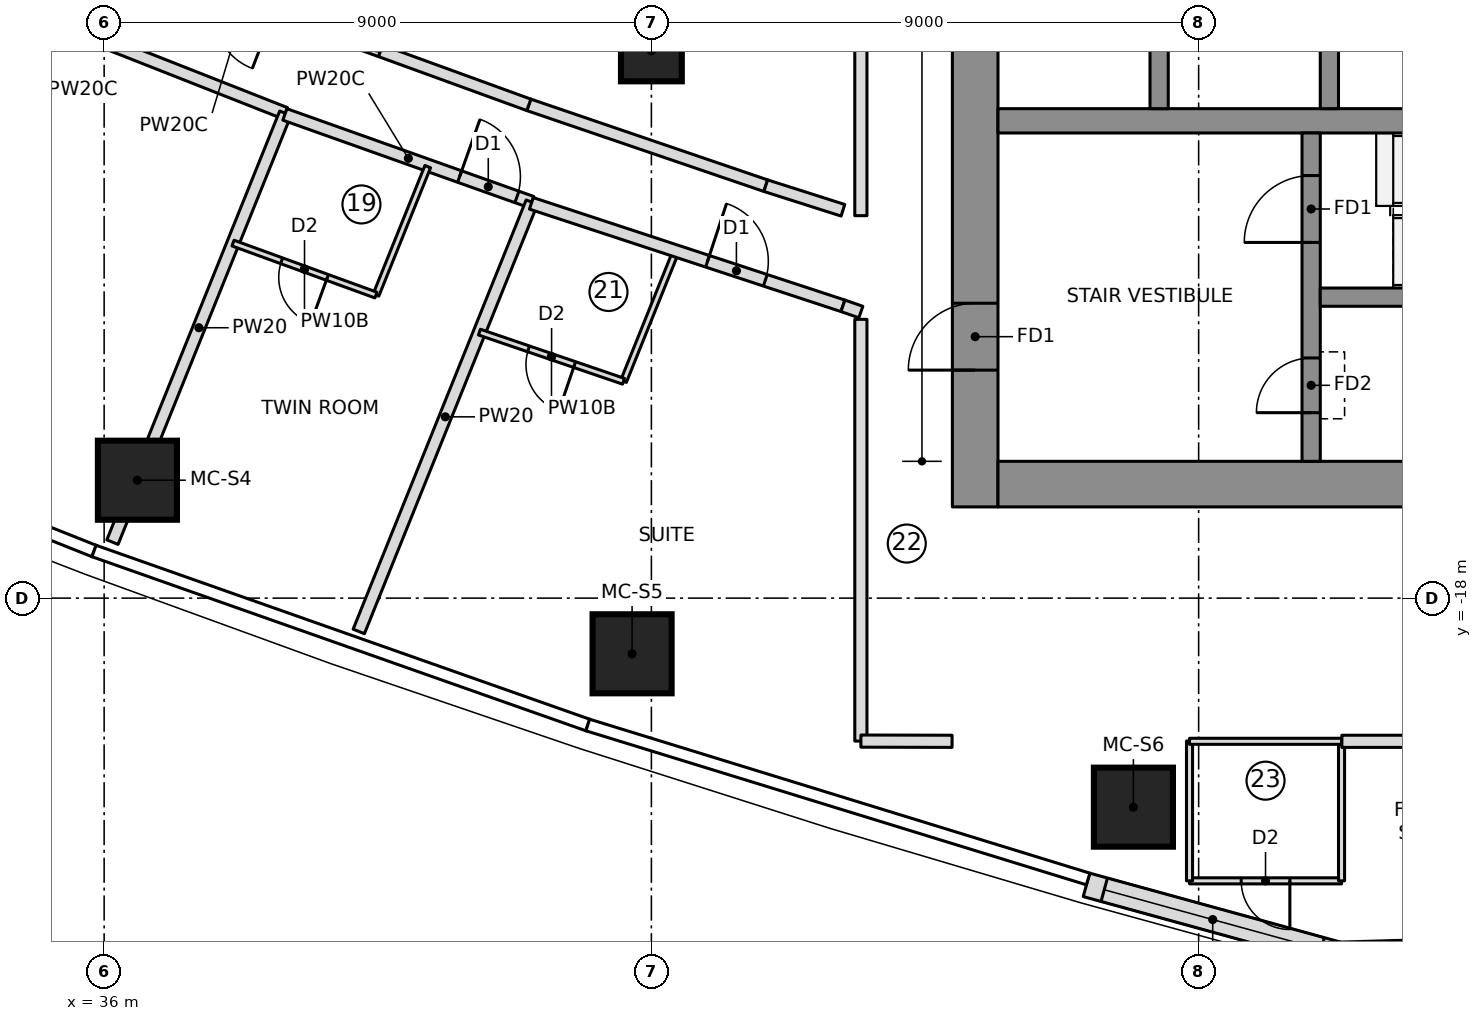
"""IFC4 building model, lengths in metres.
Left out: names, types, materials, properties, quantities, classifications, styles, units other than length and angle.
Written with IfcOpenShell. Run it as: python <this file> out.ifc"""

import sys

from ifc_helpers import new_model, si_unit, direction, frame, frame_2d, origin, origin_2d, place, context, subcontext, project, spatial, polyline, rectangle, outline, extrude, element, fill, save


model = new_model("IFC4")
c1 = context("Model", 3, precision=1e-05, world=origin(), true_north=direction((0.0, 1.0)))
c2 = subcontext(c1, "Body", "Model", "MODEL_VIEW")
j1 = project(units=[si_unit("LENGTHUNIT", "METRE"), si_unit("PLANEANGLEUNIT", "RADIAN")], contexts=[c1])
p1 = place(None, origin())
s1 = spatial("IfcSite", under=j1, at=p1, CompositionType="ELEMENT")
p2 = place(p1, origin())
s2 = spatial("IfcBuilding", under=s1, at=p2, CompositionType="ELEMENT")
p3 = place(p2, frame((0.0, 0.0, 179.05)))
s3 = spatial("IfcBuildingStorey", under=s2, at=p3, CompositionType="ELEMENT", Elevation=179.05)
p4 = place(p3, frame((50.325, -16.5, 0.0), z_axis=(0.0, 0.0, 1.0), x_axis=(0.0, 1.0, 0.0)))
e1 = element("IfcWall", 1, at=p4, inside=s3, PredefinedType="SHEAR", context=c2, shape_type="SweptSolid", body=[
    extrude(rectangle(XDim=9.85, YDim=0.75, at=frame_2d((4.925, 0.0))), origin(), (0.0, 0.0, 1.0), 3.55),
])
p5 = place(p4, frame((2.25, 0.0, 0.0)))
e2 = element("IfcOpeningElement", 2, at=p5, cuts=e1, PredefinedType="OPENING", context=c2, shape_type="SweptSolid", body=[
    extrude(rectangle(XDim=1.1, YDim=2.1, at=frame_2d((0.55, 1.05))), frame((0.0, 0.385, 0.0), z_axis=(0.0, -1.0, 0.0), x_axis=(1.0, 0.0, 0.0)), (0.0, 0.0, 1.0), 0.77),
])
p6 = place(p3, frame((50.7, -16.125, 0.0), z_axis=(0.0, 0.0, 1.0), x_axis=(1.0, 0.0, 0.0)))
e3 = element("IfcWall", 3, at=p6, inside=s3, PredefinedType="SHEAR", context=c2, shape_type="SweptSolid", body=[
    extrude(rectangle(XDim=13.77, YDim=0.75, at=frame_2d((6.885, 0.0))), origin(), (0.0, 0.0, 1.0), 3.55),
])
p7 = place(p3, frame((50.7, -10.15, 0.0), z_axis=(0.0, 0.0, 1.0), x_axis=(1.0, 0.0, 0.0)))
e4 = element("IfcWall", 4, at=p7, inside=s3, PredefinedType="SHEAR", context=c2, shape_type="SweptSolid", body=[
    extrude(rectangle(XDim=13.02, YDim=0.4, at=frame_2d((6.51, 0.0))), origin(), (0.0, 0.0, 1.0), 3.55),
])
for number, where, z_axis, x_axis in (
    (5, (53.35, -9.95, 0.0), (0.0, 0.0, 1.0), (0.0, 1.0, 0.0)),
    (6, (56.15, -9.95, 0.0), (0.0, 0.0, 1.0), (0.0, 1.0, 0.0)),
):
    element("IfcWall", number, at=place(p3, frame(where, z_axis=z_axis, x_axis=x_axis)), inside=s3, PredefinedType="SHEAR", context=c2, shape_type="SweptSolid", body=[
        extrude(rectangle(XDim=3.0, YDim=0.3, at=frame_2d((1.5, 0.0))), origin(), (0.0, 0.0, 1.0), 3.55),
    ])
p8 = place(p3, frame((55.85, -15.75, 0.0), z_axis=(0.0, 0.0, 1.0), x_axis=(0.0, 1.0, 0.0)))
e7 = element("IfcWall", 7, at=p8, inside=s3, PredefinedType="SHEAR", context=c2, shape_type="SweptSolid", body=[
    extrude(rectangle(XDim=5.4, YDim=0.3, at=frame_2d((2.7, 0.0))), origin(), (0.0, 0.0, 1.0), 3.55),
])
p9 = place(p8, frame((3.6, 0.0, 0.0)))
e8 = element("IfcOpeningElement", 8, at=p9, cuts=e7, PredefinedType="OPENING", context=c2, shape_type="SweptSolid", body=[
    extrude(rectangle(XDim=1.1, YDim=2.1, at=frame_2d((0.55, 1.05))), frame((0.0, 0.16, 0.0), z_axis=(0.0, -1.0, 0.0), x_axis=(1.0, 0.0, 0.0)), (0.0, 0.0, 1.0), 0.32),
])
p10 = place(p8, frame((0.8, 0.0, 0.0)))
e9 = element("IfcOpeningElement", 9, at=p10, cuts=e7, PredefinedType="OPENING", context=c2, shape_type="SweptSolid", body=[
    extrude(rectangle(XDim=0.9, YDim=2.1, at=frame_2d((0.45, 1.05))), frame((0.0, 0.16, 0.0), z_axis=(0.0, -1.0, 0.0), x_axis=(1.0, 0.0, 0.0)), (0.0, 0.0, 1.0), 0.32),
])
p11 = place(p3, frame((56.0, -13.05, 0.0), z_axis=(0.0, 0.0, 1.0), x_axis=(1.0, 0.0, 0.0)))
e10 = element("IfcWall", 10, at=p11, inside=s3, PredefinedType="SHEAR", context=c2, shape_type="SweptSolid", body=[
    extrude(rectangle(XDim=7.72, YDim=0.3, at=frame_2d((3.86, 0.0))), origin(), (0.0, 0.0, 1.0), 3.55),
])
for number, where, z_axis, x_axis in (
    (11, (36.547, -16.061, 0.0), (0.0, 0.0, 1.0), (1.0, 0.0, 0.0)),
    (12, (44.683, -18.916, 0.0), (0.0, 0.0, 1.0), (1.0, 0.0, 0.0)),
    (13, (52.927, -21.438, 0.0), (0.0, 0.0, 1.0), (1.0, 0.0, 0.0)),
):
    element("IfcColumn", number, at=place(p3, frame(where, z_axis=z_axis, x_axis=x_axis)), inside=s3, PredefinedType="COLUMN", context=c2, shape_type="SweptSolid", body=[
        extrude(rectangle(XDim=1.3, YDim=1.3, at=origin_2d()), origin(), (0.0, 0.0, 1.0), 3.55),
    ])
p12 = place(p3, frame((45.0, -9.0, 0.0), z_axis=(0.0, 0.0, 1.0), x_axis=(1.0, 0.0, 0.0)))
e14 = element("IfcColumn", 14, at=p12, inside=s3, PredefinedType="COLUMN", context=c2, shape_type="SweptSolid", body=[
    extrude(rectangle(XDim=1.0, YDim=1.0, at=origin_2d()), origin(), (0.0, 0.0, 1.0), 3.55),
])
p13 = place(p3, frame((52.155, -22.716, 0.0), z_axis=(0.0, 0.0, 1.0), x_axis=(0.964205755089, -0.265155165617, 0.0)))
e15 = element("IfcWall", 15, at=p13, inside=s3, PredefinedType="NOTDEFINED", context=c2, shape_type="SweptSolid", body=[
    extrude(outline(polyline([(0.0, -0.2), (4.337, -0.2), (4.277, 0.2), (0.0, 0.2), (0.0, -0.2)])), origin(), (0.0, 0.0, 1.0), 3.25),
])
p14 = place(p13, frame((0.303, 0.0, 0.9)))
e16 = element("IfcOpeningElement", 16, at=p14, cuts=e15, PredefinedType="OPENING", context=c2, shape_type="SweptSolid", body=[
    extrude(rectangle(XDim=3.7, YDim=1.8, at=frame_2d((1.85, 0.9))), frame((0.0, 0.21, 0.0), z_axis=(0.0, -1.0, 0.0), x_axis=(1.0, 0.0, 0.0)), (0.0, 0.0, 1.0), 0.42),
])
p15 = place(p3, frame((56.308, -23.858, 0.0), z_axis=(0.0, 0.0, 1.0), x_axis=(0.999587920197, 0.028705222472, 0.0)))
e17 = element("IfcWall", 17, at=p15, inside=s3, PredefinedType="NOTDEFINED", context=c2, shape_type="SweptSolid", body=[
    extrude(outline(polyline([(-0.03, -0.2), (3.989, -0.2), (3.87, 0.2), (0.03, 0.2), (-0.03, -0.2)])), origin(), (0.0, 0.0, 1.0), 3.25),
])
p16 = place(p15, frame((0.865, 0.0, 0.6)))
e18 = element("IfcOpeningElement", 18, at=p16, cuts=e17, PredefinedType="OPENING", context=c2, shape_type="SweptSolid", body=[
    extrude(outline(polyline([(0.0, 1.35), (0.084, 1.771), (0.322, 2.128), (0.679, 2.366), (1.1, 2.45), (1.521, 2.366), (1.878, 2.128), (2.116, 1.771), (2.2, 1.35), (2.2, 1.1), (2.116, 0.679), (1.878, 0.322), (1.521, 0.084), (1.1, 0.0), (0.679, 0.084), (0.322, 0.322), (0.084, 0.679), (0.0, 1.1), (0.0, 1.35)])), frame((0.0, 0.21, 0.0), z_axis=(0.0, -1.0, 0.0), x_axis=(1.0, 0.0, 0.0)), (0.0, 0.0, 1.0), 0.42),
])
p17 = place(p3, frame((56.35, -22.65, 0.0), z_axis=(0.0, 0.0, 1.0), x_axis=(-1.0, 0.0, 0.0)))
e19 = element("IfcWall", 19, at=p17, inside=s3, PredefinedType="PARTITIONING", context=c2, shape_type="SweptSolid", body=[
    extrude(rectangle(XDim=2.5, YDim=0.1, at=frame_2d((1.25, 0.0))), origin(), (0.0, 0.0, 1.0), 3.25),
])
p18 = place(p17, frame((0.85, 0.0, 0.0)))
e20 = element("IfcOpeningElement", 20, at=p18, cuts=e19, PredefinedType="OPENING", context=c2, shape_type="SweptSolid", body=[
    extrude(rectangle(XDim=0.8, YDim=2.1, at=frame_2d((0.4, 1.05))), frame((0.0, 0.06, 0.0), z_axis=(0.0, -1.0, 0.0), x_axis=(1.0, 0.0, 0.0)), (0.0, 0.0, 1.0), 0.12),
])
for number, where, z_axis, x_axis in (
    (21, (53.85, -22.65, 0.0), (0.0, 0.0, 1.0), (0.0, 1.0, 0.0)),
    (22, (56.35, -20.35, 0.0), (0.0, 0.0, 1.0), (0.0, -1.0, 0.0)),
):
    element("IfcWall", number, at=place(p3, frame(where, z_axis=z_axis, x_axis=x_axis)), inside=s3, PredefinedType="PARTITIONING", context=c2, shape_type="SweptSolid", body=[
        extrude(rectangle(XDim=2.3, YDim=0.1, at=frame_2d((1.15, 0.0))), origin(), (0.0, 0.0, 1.0), 3.25),
    ])
p19 = place(p3, frame((30.958, -6.866, 0.0), z_axis=(0.0, 0.0, 1.0), x_axis=(0.93040517394, -0.366532689274, 0.0)))
e23 = element("IfcWall", 23, at=p19, inside=s3, PredefinedType="PARTITIONING", context=c2, shape_type="SweptSolid", body=[
    extrude(rectangle(XDim=8.622, YDim=0.2, at=frame_2d((4.311, 0.0))), origin(), (0.0, 0.0, 1.0), 3.25),
])
p20 = place(p19, frame((4.25, 0.0, 0.0)))
e24 = element("IfcOpeningElement", 24, at=p20, cuts=e23, PredefinedType="OPENING", context=c2, shape_type="SweptSolid", body=[
    extrude(rectangle(XDim=1.0, YDim=2.1, at=frame_2d((0.5, 1.05))), frame((0.0, 0.11, 0.0), z_axis=(0.0, -1.0, 0.0), x_axis=(1.0, 0.0, 0.0)), (0.0, 0.0, 1.0), 0.22),
])
p21 = place(p3, frame((36.137, -17.079, 0.0), z_axis=(0.0, 0.0, 1.0), x_axis=(0.373863662938, 0.927483671843, 0.0)))
e25 = element("IfcWall", 25, at=p21, inside=s3, PredefinedType="PARTITIONING", context=c2, shape_type="SweptSolid", body=[
    extrude(rectangle(XDim=7.604, YDim=0.2, at=frame_2d((3.802, 0.0))), origin(), (0.0, 0.0, 1.0), 3.25),
])
p22 = place(p3, frame((38.972, -10.045, 0.0), z_axis=(0.0, 0.0, 1.0), x_axis=(0.942220252757, -0.334994022773, 0.0)))
e26 = element("IfcWall", 26, at=p22, inside=s3, PredefinedType="PARTITIONING", context=c2, shape_type="SweptSolid", body=[
    extrude(rectangle(XDim=4.31, YDim=0.2, at=frame_2d((2.155, 0.0))), origin(), (0.0, 0.0, 1.0), 3.25),
])
p23 = place(p22, frame((3.05, 0.0, 0.0)))
e27 = element("IfcOpeningElement", 27, at=p23, cuts=e26, PredefinedType="OPENING", context=c2, shape_type="SweptSolid", body=[
    extrude(rectangle(XDim=1.0, YDim=2.1, at=frame_2d((0.5, 1.05))), frame((0.0, 0.11, 0.0), z_axis=(0.0, -1.0, 0.0), x_axis=(1.0, 0.0, 0.0)), (0.0, 0.0, 1.0), 0.22),
])
p24 = place(p3, frame((41.322, -10.903, 0.0), z_axis=(0.0, 0.0, 1.0), x_axis=(-0.373846436826, -0.927490615409, 0.0)))
e28 = element("IfcWall", 28, at=p24, inside=s3, PredefinedType="PARTITIONING", context=c2, shape_type="SweptSolid", body=[
    extrude(rectangle(XDim=2.279, YDim=0.1, at=frame_2d((1.139, 0.0))), origin(), (0.0, 0.0, 1.0), 3.25),
])
p25 = place(p3, frame((40.47, -13.016, 0.0), z_axis=(0.0, 0.0, 1.0), x_axis=(-0.939744972593, 0.341876273652, 0.0)))
e29 = element("IfcWall", 29, at=p25, inside=s3, PredefinedType="PARTITIONING", context=c2, shape_type="SweptSolid", body=[
    extrude(rectangle(XDim=2.501, YDim=0.1, at=frame_2d((1.251, 0.0))), origin(), (0.0, 0.0, 1.0), 3.25),
])
p26 = place(p25, frame((0.85, 0.0, 0.0)))
e30 = element("IfcOpeningElement", 30, at=p26, cuts=e29, PredefinedType="OPENING", context=c2, shape_type="SweptSolid", body=[
    extrude(rectangle(XDim=0.8, YDim=2.1, at=frame_2d((0.4, 1.05))), frame((0.0, 0.06, 0.0), z_axis=(0.0, -1.0, 0.0), x_axis=(1.0, 0.0, 0.0)), (0.0, 0.0, 1.0), 0.12),
])
p27 = place(p3, frame((40.188, -18.548, 0.0), z_axis=(0.0, 0.0, 1.0), x_axis=(0.373877998371, 0.927477893178, 0.0)))
e31 = element("IfcWall", 31, at=p27, inside=s3, PredefinedType="PARTITIONING", context=c2, shape_type="SweptSolid", body=[
    extrude(rectangle(XDim=7.611, YDim=0.2, at=frame_2d((3.806, 0.0))), origin(), (0.0, 0.0, 1.0), 3.25),
])
p28 = place(p3, frame((45.395, -12.318, 0.0), z_axis=(0.0, 0.0, 1.0), x_axis=(-0.373917841166, -0.927461831052, 0.0)))
e32 = element("IfcWall", 32, at=p28, inside=s3, PredefinedType="PARTITIONING", context=c2, shape_type="SweptSolid", body=[
    extrude(rectangle(XDim=2.281, YDim=0.1, at=frame_2d((1.14, 0.0))), origin(), (0.0, 0.0, 1.0), 3.25),
])
p29 = place(p3, frame((44.542, -14.434, 0.0), z_axis=(0.0, 0.0, 1.0), x_axis=(-0.946406575113, 0.322977699822, 0.0)))
e33 = element("IfcWall", 33, at=p29, inside=s3, PredefinedType="PARTITIONING", context=c2, shape_type="SweptSolid", body=[
    extrude(rectangle(XDim=2.504, YDim=0.1, at=frame_2d((1.252, 0.0))), origin(), (0.0, 0.0, 1.0), 3.25),
])
p30 = place(p29, frame((0.85, 0.0, 0.0)))
e34 = element("IfcOpeningElement", 34, at=p30, cuts=e33, PredefinedType="OPENING", context=c2, shape_type="SweptSolid", body=[
    extrude(rectangle(XDim=0.8, YDim=2.1, at=frame_2d((0.4, 1.05))), frame((0.0, 0.06, 0.0), z_axis=(0.0, -1.0, 0.0), x_axis=(1.0, 0.0, 0.0)), (0.0, 0.0, 1.0), 0.12),
])
p31 = place(p3, frame((40.547, -9.0, 0.0), z_axis=(0.0, 0.0, 1.0), x_axis=(-0.939741934926, 0.341884623435, 0.0)))
e35 = element("IfcWall", 35, at=p31, inside=s3, PredefinedType="PARTITIONING", context=c2, shape_type="SweptSolid", body=[
    extrude(rectangle(XDim=1.523, YDim=0.2, at=frame_2d((0.762, 0.0))), origin(), (0.0, 0.0, 1.0), 3.25),
])
p32 = place(p3, frame((46.881, -11.217, 0.0), z_axis=(0.0, 0.0, 1.0), x_axis=(-0.946436071896, 0.322891253852, 0.0)))
e36 = element("IfcWall", 36, at=p32, inside=s3, PredefinedType="PARTITIONING", context=c2, shape_type="SweptSolid", body=[
    extrude(rectangle(XDim=4.117, YDim=0.2, at=frame_2d((2.059, 0.0))), origin(), (0.0, 0.0, 1.0), 3.25),
])
p33 = place(p3, frame((42.984, -9.887, 0.0), z_axis=(0.0, 0.0, 1.0), x_axis=(-0.939719202565, 0.341947101655, 0.0)))
e37 = element("IfcWall", 37, at=p33, inside=s3, PredefinedType="PARTITIONING", context=c2, shape_type="SweptSolid", body=[
    extrude(rectangle(XDim=2.594, YDim=0.2, at=frame_2d((1.297, 0.0))), origin(), (0.0, 0.0, 1.0), 3.25),
])
p34 = place(p3, frame((56.355, -20.355, 0.0), z_axis=(0.0, 0.0, 1.0), x_axis=(1.0, 0.0, 0.0)))
e38 = element("IfcWall", 38, at=p34, inside=s3, PredefinedType="PARTITIONING", context=c2, shape_type="SweptSolid", body=[
    extrude(rectangle(XDim=7.354, YDim=0.2, at=frame_2d((3.677, 0.0))), origin(), (0.0, 0.0, 1.0), 3.25),
])
p35 = place(p34, frame((2.624, 0.0, 0.0)))
e39 = element("IfcOpeningElement", 39, at=p35, cuts=e38, PredefinedType="OPENING", context=c2, shape_type="SweptSolid", body=[
    extrude(rectangle(XDim=1.5, YDim=2.1, at=frame_2d((0.75, 1.05))), frame((0.0, 0.11, 0.0), z_axis=(0.0, -1.0, 0.0), x_axis=(1.0, 0.0, 0.0)), (0.0, 0.0, 1.0), 0.22),
])
p36 = place(p3, frame((53.85, -20.355, 0.0), z_axis=(0.0, 0.0, 1.0), x_axis=(1.0, 0.0, 0.0)))
e40 = element("IfcWall", 40, at=p36, inside=s3, PredefinedType="PARTITIONING", context=c2, shape_type="SweptSolid", body=[
    extrude(rectangle(XDim=2.5, YDim=0.1, at=frame_2d((1.25, 0.0))), origin(), (0.0, 0.0, 1.0), 3.25),
])
p37 = place(p3, frame((43.026, -11.507, 0.0), z_axis=(0.0, 0.0, 1.0), x_axis=(0.949951949432, -0.312396052744, 0.0)))
e41 = element("IfcWall", 41, at=p37, inside=s3, PredefinedType="PARTITIONING", context=c2, shape_type="SweptSolid", body=[
    extrude(rectangle(XDim=5.394, YDim=0.2, at=frame_2d((2.697, 0.0))), origin(), (0.0, 0.0, 1.0), 3.25),
])
p38 = place(p37, frame((3.05, 0.0, 0.0)))
e42 = element("IfcOpeningElement", 42, at=p38, cuts=e41, PredefinedType="OPENING", context=c2, shape_type="SweptSolid", body=[
    extrude(rectangle(XDim=1.0, YDim=2.1, at=frame_2d((0.5, 1.05))), frame((0.0, 0.11, 0.0), z_axis=(0.0, -1.0, 0.0), x_axis=(1.0, 0.0, 0.0)), (0.0, 0.0, 1.0), 0.22),
])
p39 = place(p3, frame((48.15, -11.621, 0.0), z_axis=(0.0, 0.0, 1.0), x_axis=(-0.952761948983, 0.303718074157, 0.0)))
e43 = element("IfcWall", 43, at=p39, inside=s3, PredefinedType="PARTITIONING", context=c2, shape_type="SweptSolid", body=[
    extrude(rectangle(XDim=1.332, YDim=0.2, at=frame_2d((0.666, 0.0))), origin(), (0.0, 0.0, 1.0), 3.25),
])
p40 = place(p3, frame((48.445, 11.71, 0.0), z_axis=(0.0, 0.0, 1.0), x_axis=(0.0, -1.0, 0.0)))
e44 = element("IfcWall", 44, at=p40, inside=s3, PredefinedType="PARTITIONING", context=c2, shape_type="SweptSolid", body=[
    extrude(rectangle(XDim=23.42, YDim=0.2, at=frame_2d((11.71, 0.0))), origin(), (0.0, 0.0, 1.0), 3.25),
])
p41 = place(p3, frame((48.15, -13.192, 0.0), z_axis=(0.0, 0.0, 1.0), x_axis=(0.944623214561, -0.328156947987, 0.0)))
e45 = element("IfcWall", 45, at=p41, inside=s3, PredefinedType="PARTITIONING", context=c2, shape_type="SweptSolid", body=[
    extrude(rectangle(XDim=0.312, YDim=0.2, at=frame_2d((0.156, 0.0))), origin(), (0.0, 0.0, 1.0), 3.25),
])
p42 = place(p3, frame((48.445, -13.415, 0.0), z_axis=(0.0, 0.0, 1.0), x_axis=(3.5195157e-05, -0.999999999381, 0.0)))
e46 = element("IfcWall", 46, at=p42, inside=s3, PredefinedType="PARTITIONING", context=c2, shape_type="SweptSolid", body=[
    extrude(rectangle(XDim=6.937, YDim=0.2, at=frame_2d((3.468, 0.0))), origin(), (0.0, 0.0, 1.0), 3.25),
])
p43 = place(p3, frame((48.445, -20.352, 0.0), z_axis=(0.0, 0.0, 1.0), x_axis=(0.999997403051, -0.002279010849, 0.0)))
e47 = element("IfcWall", 47, at=p43, inside=s3, PredefinedType="PARTITIONING", context=c2, shape_type="SweptSolid", body=[
    extrude(rectangle(XDim=1.5, YDim=0.2, at=frame_2d((0.75, 0.0))), origin(), (0.0, 0.0, 1.0), 3.25),
])
p44 = place(p14, origin())
e48 = element("IfcWindow", 48, at=p44, inside=s3, PartitioningType="SINGLE_PANEL", PredefinedType="WINDOW", context=c2, shape_type="SweptSolid", body=[
    extrude(rectangle(XDim=3.7, YDim=1.8, at=frame_2d((1.85, 0.9))), frame((0.0, 0.17, 0.0), z_axis=(0.0, -1.0, 0.0), x_axis=(1.0, 0.0, 0.0)), (0.0, 0.0, 1.0), 0.06),
])
fill(e16, e48)
p45 = place(p16, origin())
e49 = element("IfcWindow", 49, at=p45, inside=s3, PartitioningType="SINGLE_PANEL", PredefinedType="WINDOW", context=c2, shape_type="SweptSolid", body=[
    extrude(outline(polyline([(0.0, 1.35), (0.084, 1.771), (0.322, 2.128), (0.679, 2.366), (1.1, 2.45), (1.521, 2.366), (1.878, 2.128), (2.116, 1.771), (2.2, 1.35), (2.2, 1.1), (2.116, 0.679), (1.878, 0.322), (1.521, 0.084), (1.1, 0.0), (0.679, 0.084), (0.322, 0.322), (0.084, 0.679), (0.0, 1.1), (0.0, 1.35)])), frame((0.0, 0.17, 0.0), z_axis=(0.0, -1.0, 0.0), x_axis=(1.0, 0.0, 0.0)), (0.0, 0.0, 1.0), 0.06),
])
fill(e18, e49)
p46 = place(p18, origin())
e50 = element("IfcDoor", 50, at=p46, inside=s3, OperationType="SINGLE_SWING_LEFT", PredefinedType="DOOR", context=c2, shape_type="SweptSolid", body=[
    extrude(rectangle(XDim=0.8, YDim=2.1, at=frame_2d((0.4, 1.05))), frame((0.0, 0.025, 0.0), z_axis=(0.0, -1.0, 0.0), x_axis=(1.0, 0.0, 0.0)), (0.0, 0.0, 1.0), 0.05),
])
fill(e20, e50)
p47 = place(p26, origin())
e51 = element("IfcDoor", 51, at=p47, inside=s3, OperationType="SINGLE_SWING_LEFT", PredefinedType="DOOR", context=c2, shape_type="SweptSolid", body=[
    extrude(rectangle(XDim=0.8, YDim=2.1, at=frame_2d((0.4, 1.05))), frame((0.0, 0.025, 0.0), z_axis=(0.0, -1.0, 0.0), x_axis=(1.0, 0.0, 0.0)), (0.0, 0.0, 1.0), 0.05),
])
fill(e30, e51)
p48 = place(p23, origin())
e52 = element("IfcDoor", 52, at=p48, inside=s3, OperationType="SINGLE_SWING_LEFT", PredefinedType="DOOR", context=c2, shape_type="SweptSolid", body=[
    extrude(rectangle(XDim=1.0, YDim=2.1, at=frame_2d((0.5, 1.05))), frame((0.0, 0.025, 0.0), z_axis=(0.0, -1.0, 0.0), x_axis=(1.0, 0.0, 0.0)), (0.0, 0.0, 1.0), 0.05),
])
fill(e27, e52)
p49 = place(p30, origin())
e53 = element("IfcDoor", 53, at=p49, inside=s3, OperationType="SINGLE_SWING_LEFT", PredefinedType="DOOR", context=c2, shape_type="SweptSolid", body=[
    extrude(rectangle(XDim=0.8, YDim=2.1, at=frame_2d((0.4, 1.05))), frame((0.0, 0.025, 0.0), z_axis=(0.0, -1.0, 0.0), x_axis=(1.0, 0.0, 0.0)), (0.0, 0.0, 1.0), 0.05),
])
fill(e34, e53)
p50 = place(p38, origin())
e54 = element("IfcDoor", 54, at=p50, inside=s3, OperationType="SINGLE_SWING_LEFT", PredefinedType="DOOR", context=c2, shape_type="SweptSolid", body=[
    extrude(rectangle(XDim=1.0, YDim=2.1, at=frame_2d((0.5, 1.05))), frame((0.0, 0.025, 0.0), z_axis=(0.0, -1.0, 0.0), x_axis=(1.0, 0.0, 0.0)), (0.0, 0.0, 1.0), 0.05),
])
fill(e42, e54)
p51 = place(p9, origin())
e55 = element("IfcDoor", 55, at=p51, inside=s3, OperationType="SINGLE_SWING_RIGHT", PredefinedType="DOOR", context=c2, shape_type="SweptSolid", body=[
    extrude(rectangle(XDim=1.1, YDim=2.1, at=frame_2d((0.55, 1.05))), frame((0.0, 0.025, 0.0), z_axis=(0.0, -1.0, 0.0), x_axis=(1.0, 0.0, 0.0)), (0.0, 0.0, 1.0), 0.05),
])
fill(e8, e55)
p52 = place(p5, origin())
e56 = element("IfcDoor", 56, at=p52, inside=s3, OperationType="SINGLE_SWING_RIGHT", PredefinedType="DOOR", context=c2, shape_type="SweptSolid", body=[
    extrude(rectangle(XDim=1.1, YDim=2.1, at=frame_2d((0.55, 1.05))), frame((0.0, 0.025, 0.0), z_axis=(0.0, -1.0, 0.0), x_axis=(1.0, 0.0, 0.0)), (0.0, 0.0, 1.0), 0.05),
])
fill(e2, e56)
p53 = place(p10, origin())
e57 = element("IfcDoor", 57, at=p53, inside=s3, OperationType="SINGLE_SWING_LEFT", PredefinedType="DOOR", context=c2, shape_type="SweptSolid", body=[
    extrude(rectangle(XDim=0.9, YDim=2.1, at=frame_2d((0.45, 1.05))), frame((0.0, 0.025, 0.0), z_axis=(0.0, -1.0, 0.0), x_axis=(1.0, 0.0, 0.0)), (0.0, 0.0, 1.0), 0.05),
])
fill(e9, e57)
save(model, sys.argv[1])
